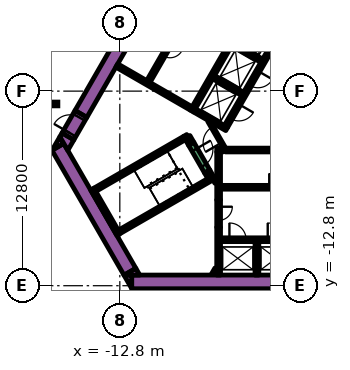
"""IFC4 building model, lengths in metres.
Left out: names, types, materials, properties, quantities, classifications, styles, units other than length and angle.
Written with IfcOpenShell. Run it as: python <this file> out.ifc"""

import sys

from ifc_helpers import new_model, si_unit, direction, frame, frame_2d, origin, origin_2d, place, context, subcontext, project, spatial, polyline, rectangle, outline, extrude, element, fill, save


model = new_model("IFC4")
c1 = context("Model", 3, precision=1e-05, world=origin(), true_north=direction((0.0, 1.0)))
c2 = subcontext(c1, "Body", "Model", "MODEL_VIEW")
j1 = project(units=[si_unit("LENGTHUNIT", "METRE"), si_unit("PLANEANGLEUNIT", "RADIAN")], contexts=[c1])
p1 = place(None, origin())
s1 = spatial("IfcSite", under=j1, at=p1, CompositionType="ELEMENT")
p2 = place(p1, origin())
s2 = spatial("IfcBuilding", under=s1, at=p2, CompositionType="ELEMENT")
p3 = place(p2, origin())
s3 = spatial("IfcBuildingStorey", under=s2, at=p3, CompositionType="ELEMENT", Elevation=0.0)
p4 = place(p3, frame((-15.36, -1.503, -1.8), z_axis=(0.0, 0.0, 1.0), x_axis=(0.50000389221, 0.866023156604, 0.0)))
e1 = element("IfcWall", 1, at=p4, inside=s3, PredefinedType="SOLIDWALL", context=c2, shape_type="SweptSolid", body=[
    extrude(rectangle(XDim=21.0, YDim=0.9, at=frame_2d((10.5, 0.0))), origin(), (0.0, 0.0, 1.0), 7.8),
])
p5 = place(p3, frame((-12.019, -12.55, -1.8), z_axis=(0.0, 0.0, 1.0), x_axis=(1.0, 0.0, 0.0)))
e2 = element("IfcWall", 2, at=p5, inside=s3, PredefinedType="SOLIDWALL", context=c2, shape_type="SweptSolid", body=[
    extrude(rectangle(XDim=21.63, YDim=0.9, at=frame_2d((10.815, 0.0))), origin(), (0.0, 0.0, 1.0), 7.8),
])
p6 = place(p3, frame((0.0, 0.0, -1.8)))
e3 = element("IfcWall", 3, at=p6, inside=s3, PredefinedType="SOLIDWALL", context=c2, shape_type="SweptSolid", body=[
    extrude(outline(polyline([(-12.529, -12.1), (-12.021, -12.1), (-12.021, -12.98), (-12.529, -12.1)])), origin(), (0.0, 0.0, 1.0), 7.8),
])
p7 = place(p3, frame((-12.134, -11.883, -1.8), z_axis=(0.0, 0.0, 1.0), x_axis=(-0.500005339912, 0.866022320763, 0.0)))
e4 = element("IfcWall", 4, at=p7, inside=s3, PredefinedType="SOLIDWALL", context=c2, shape_type="SweptSolid", body=[
    extrude(rectangle(XDim=9.488, YDim=0.9, at=frame_2d((4.744, 0.0))), origin(), (0.0, 0.0, 1.0), 7.8),
])
e5 = element("IfcWall", 5, at=p6, inside=s3, PredefinedType="SOLIDWALL", context=c2, shape_type="SweptSolid", body=[
    extrude(outline(polyline([(-16.489, -3.44), (-17.251, -3.88), (-16.743, -3.0), (-16.489, -3.44)])), origin(), (0.0, 0.0, 1.0), 7.8),
])
e6 = element("IfcWall", 6, at=p6, inside=s3, PredefinedType="SOLIDWALL", context=c2, shape_type="SweptSolid", body=[
    extrude(outline(polyline([(-11.489, -12.1), (-12.505, -12.1), (-11.743, -11.66), (-11.489, -12.1)])), origin(), (0.0, 0.0, 1.0), 7.8),
])
e7 = element("IfcWall", 7, at=p6, inside=s3, PredefinedType="SOLIDWALL", context=c2, shape_type="SweptSolid", body=[
    extrude(outline(polyline([(-15.82, -3.201), (-16.223, -3.9), (-16.743, -3.0), (-16.599, -2.751), (-15.82, -3.201)])), origin(), (0.0, 0.0, 1.0), 7.8),
])
p8 = place(p3, frame((-12.885, -9.431, 0.0), z_axis=(0.0, 0.0, 1.0), x_axis=(-0.500020560727, 0.866013532718, 0.0)))
e8 = element("IfcWall", 8, at=p8, inside=s3, PredefinedType="SOLIDWALL", context=c2, shape_type="SweptSolid", body=[
    extrude(rectangle(XDim=3.45, YDim=0.25, at=frame_2d((1.725, 0.0))), origin(), (0.0, 0.0, 1.0), 6.0),
])
p9 = place(p3, frame((-14.44, -6.49, 0.0), z_axis=(0.0, 0.0, 1.0), x_axis=(0.866022966069, 0.500004222222, 0.0)))
e9 = element("IfcWall", 9, at=p9, inside=s3, PredefinedType="SOLIDWALL", context=c2, shape_type="SweptSolid", body=[
    extrude(rectangle(XDim=6.8, YDim=0.25, at=frame_2d((3.4, 0.0))), origin(), (0.0, 0.0, 1.0), 6.0),
])
p10 = place(p3, frame((-8.168, -3.503, 0.0), z_axis=(0.0, 0.0, 1.0), x_axis=(-0.499952099219, 0.866053057547, 0.0)))
e10 = element("IfcWall", 10, at=p10, inside=s3, PredefinedType="SOLIDWALL", context=c2, shape_type="SweptSolid", body=[
    extrude(rectangle(XDim=0.675, YDim=0.25, at=frame_2d((0.337, 0.0))), origin(), (0.0, 0.0, 1.0), 6.0),
])
p11 = place(p3, frame((-12.84, -9.261, 0.0), z_axis=(0.0, 0.0, 1.0), x_axis=(0.866016039709, 0.500016218704, 0.0)))
e11 = element("IfcWall", 11, at=p11, inside=s3, PredefinedType="SOLIDWALL", context=c2, shape_type="SweptSolid", body=[
    extrude(rectangle(XDim=7.05, YDim=0.25, at=frame_2d((3.525, 0.0))), origin(), (0.0, 0.0, 1.0), 6.0),
])
p12 = place(p3, frame((-6.905, -5.69, 0.0), z_axis=(0.0, 0.0, 1.0), x_axis=(-0.500402024738, 0.865793170242, 0.0)))
e12 = element("IfcWall", 12, at=p12, inside=s3, PredefinedType="SOLIDWALL", context=c2, shape_type="SweptSolid", body=[
    extrude(rectangle(XDim=0.425, YDim=0.25, at=frame_2d((0.212, 0.0))), origin(), (0.0, 0.0, 1.0), 6.0),
])
p13 = place(p3, frame((-3.78, -12.1, -1.8), z_axis=(0.0, 0.0, 1.0), x_axis=(0.0, 1.0, 0.0)))
e13 = element("IfcWall", 13, at=p13, inside=s3, PredefinedType="SOLIDWALL", context=c2, shape_type="SweptSolid", body=[
    extrude(rectangle(XDim=2.2, YDim=0.25, at=frame_2d((1.1, 0.0))), origin(), (0.0, 0.0, 1.0), 7.8),
])
p14 = place(p3, frame((-6.3, -12.1, -1.8), z_axis=(0.0, 0.0, 1.0), x_axis=(0.0, 1.0, 0.0)))
e14 = element("IfcWall", 14, at=p14, inside=s3, PredefinedType="SOLIDWALL", context=c2, shape_type="SweptSolid", body=[
    extrude(rectangle(XDim=3.146, YDim=0.25, at=frame_2d((1.573, 0.0))), origin(), (0.0, 0.0, 1.0), 7.8),
])
p15 = place(p3, frame((-5.845, -3.875, -1.8), z_axis=(0.0, 0.0, 1.0), x_axis=(1.0, 0.0, 0.0)))
e15 = element("IfcWall", 15, at=p15, inside=s3, PredefinedType="SOLIDWALL", context=c2, shape_type="SweptSolid", body=[
    extrude(rectangle(XDim=12.27, YDim=0.25, at=frame_2d((6.135, 0.0))), origin(), (0.0, 0.0, 1.0), 7.8),
])
p16 = place(p3, frame((-6.425, -3.875, -1.8), z_axis=(0.0, 0.0, 1.0), x_axis=(1.0, 0.0, 0.0)))
e16 = element("IfcWall", 16, at=p16, inside=s3, PredefinedType="SOLIDWALL", context=c2, shape_type="SweptSolid", body=[
    extrude(rectangle(XDim=0.428, YDim=0.25, at=frame_2d((0.214, 0.0))), origin(), (0.0, 0.0, 1.0), 7.8),
])
p17 = place(p3, frame((-6.3, -4.0, -1.8), z_axis=(0.0, 0.0, 1.0), x_axis=(0.0, -1.0, 0.0)))
e17 = element("IfcWall", 17, at=p17, inside=s3, PredefinedType="SOLIDWALL", context=c2, shape_type="SweptSolid", body=[
    extrude(rectangle(XDim=3.154, YDim=0.25, at=frame_2d((1.577, 0.0))), origin(), (0.0, 0.0, 1.0), 7.8),
])
p18 = place(p3, frame((-8.06, -1.311, -1.8), z_axis=(0.0, 0.0, 1.0), x_axis=(0.50000273126, 0.866023826885, 0.0)))
e18 = element("IfcWall", 18, at=p18, inside=s3, PredefinedType="SOLIDWALL", context=c2, shape_type="SweptSolid", body=[
    extrude(rectangle(XDim=10.33, YDim=0.25, at=frame_2d((5.165, 0.0))), origin(), (0.0, 0.0, 1.0), 7.8),
])
for number, where, z_axis, x_axis in (
    (19, (-5.369, 3.1, -1.8), (0.0, 0.0, 1.0), (0.866, -0.5, 0.0)),
    (20, (-4.724, -0.182, -1.8), (0.0, 0.0, 1.0), (-0.866, 0.5, 0.0)),
):
    element("IfcWall", number, at=place(p3, frame(where, z_axis=z_axis, x_axis=x_axis)), inside=s3, PredefinedType="SOLIDWALL", context=c2, shape_type="SweptSolid", body=[
        extrude(rectangle(XDim=2.2, YDim=0.25, at=frame_2d((1.1, 0.0))), origin(), (0.0, 0.0, 1.0), 7.8),
    ])
e21 = element("IfcWall", 21, at=p6, inside=s3, PredefinedType="SOLIDWALL", context=c2, shape_type="SweptSolid", body=[
    extrude(outline(polyline([(-5.922, -2.257), (-5.922, -2.257), (-5.705, -2.382), (-5.83, -2.598), (-6.829, -2.021), (-6.88, -1.934), (-6.88, -1.934), (-6.93, -1.963), (-7.952, -1.373), (-7.827, -1.156), (-5.922, -2.257)])), origin(), (0.0, 0.0, 1.0), 7.8),
])
p19 = place(p3, frame((-8.106, -1.14, -1.8), z_axis=(0.0, 0.0, 1.0), x_axis=(-0.866000643155, 0.500042884217, 0.0)))
e22 = element("IfcWall", 22, at=p19, inside=s3, PredefinedType="SOLIDWALL", context=c2, shape_type="SweptSolid", body=[
    extrude(rectangle(XDim=5.65, YDim=0.25, at=frame_2d((2.825, 0.0))), origin(), (0.0, 0.0, 1.0), 7.8),
])
p20 = place(p3, frame((-6.708, -12.068, 0.0), z_axis=(0.0, 0.0, 1.0), x_axis=(0.500000789788, 0.8660249478, 0.0)))
e23 = element("IfcWall", 23, at=p20, inside=s3, PredefinedType="PARTITIONING", context=c2, shape_type="SweptSolid", body=[
    extrude(rectangle(XDim=0.456, YDim=0.15, at=frame_2d((0.228, 0.0))), origin(), (0.0, 0.0, 1.0), 5.1),
])
p21 = place(p3, frame((-6.534, -12.068, 0.0), z_axis=(0.0, 0.0, 1.0), x_axis=(0.500240224089, 0.865886665912, 0.0)))
e24 = element("IfcWall", 24, at=p21, inside=s3, PredefinedType="PARTITIONING", context=c2, shape_type="SweptSolid", body=[
    extrude(rectangle(XDim=0.109, YDim=0.15, at=frame_2d((0.054, 0.0))), origin(), (0.0, 0.0, 1.0), 5.1),
])
p22 = place(p3, frame((-6.48, -6.027, -1.8), z_axis=(0.0, 0.0, 1.0), x_axis=(-0.499927229454, 0.866067413802, 0.0)))
e25 = element("IfcWall", 25, at=p22, inside=s3, PredefinedType="PARTITIONING", context=c2, shape_type="SweptSolid", body=[
    extrude(rectangle(XDim=0.929, YDim=0.15, at=frame_2d((0.464, 0.0))), origin(), (0.0, 0.0, 1.0), 7.8),
])
p23 = place(p3, frame((-8.252, -2.958, 0.0), z_axis=(0.0, 0.0, 1.0), x_axis=(0.500174715838, -0.865924508047, 0.0)))
e26 = element("IfcWall", 26, at=p23, inside=s3, PredefinedType="PARTITIONING", context=c2, shape_type="SweptSolid", body=[
    extrude(rectangle(XDim=0.514, YDim=0.15, at=frame_2d((0.257, 0.0))), origin(), (0.0, 0.0, 1.0), 5.1),
])
p24 = place(p3, frame((-6.175, -9.775, -1.8), z_axis=(0.0, 0.0, 1.0), x_axis=(1.0, 0.0, 0.0)))
e27 = element("IfcWall", 27, at=p24, inside=s3, PredefinedType="SOLIDWALL", context=c2, shape_type="SweptSolid", body=[
    extrude(rectangle(XDim=12.35, YDim=0.25, at=frame_2d((6.175, 0.0))), origin(), (0.0, 0.0, 1.0), 7.8),
])
p25 = place(p24, frame((0.585, 0.0, 1.8)))
e28 = element("IfcOpeningElement", 28, at=p25, cuts=e27, PredefinedType="OPENING", context=c2, shape_type="SweptSolid", body=[
    extrude(rectangle(XDim=1.1, YDim=2.1, at=frame_2d((0.55, 1.05))), frame((0.0, 0.135, 0.0), z_axis=(0.0, -1.0, 0.0), x_axis=(1.0, 0.0, 0.0)), (0.0, 0.0, 1.0), 0.27),
])
p26 = place(p24, frame((3.105, 0.0, 1.8)))
e29 = element("IfcOpeningElement", 29, at=p26, cuts=e27, PredefinedType="OPENING", context=c2, shape_type="SweptSolid", body=[
    extrude(rectangle(XDim=1.1, YDim=2.1, at=frame_2d((0.55, 1.05))), frame((0.0, 0.135, 0.0), z_axis=(0.0, -1.0, 0.0), x_axis=(1.0, 0.0, 0.0)), (0.0, 0.0, 1.0), 0.27),
])
p27 = place(p24, frame((5.625, 0.0, 1.8)))
e30 = element("IfcOpeningElement", 30, at=p27, cuts=e27, PredefinedType="OPENING", context=c2, shape_type="SweptSolid", body=[
    extrude(rectangle(XDim=1.1, YDim=2.1, at=frame_2d((0.55, 1.05))), frame((0.0, 0.135, 0.0), z_axis=(0.0, -1.0, 0.0), x_axis=(1.0, 0.0, 0.0)), (0.0, 0.0, 1.0), 0.27),
])
p28 = place(p24, frame((8.145, 0.0, 1.8)))
e31 = element("IfcOpeningElement", 31, at=p28, cuts=e27, PredefinedType="OPENING", context=c2, shape_type="SweptSolid", body=[
    extrude(rectangle(XDim=1.1, YDim=2.1, at=frame_2d((0.55, 1.05))), frame((0.0, 0.135, 0.0), z_axis=(0.0, -1.0, 0.0), x_axis=(1.0, 0.0, 0.0)), (0.0, 0.0, 1.0), 0.27),
])
p29 = place(p24, frame((10.665, 0.0, 1.8)))
e32 = element("IfcOpeningElement", 32, at=p29, cuts=e27, PredefinedType="OPENING", context=c2, shape_type="SweptSolid", body=[
    extrude(rectangle(XDim=1.1, YDim=2.1, at=frame_2d((0.55, 1.05))), frame((0.0, 0.135, 0.0), z_axis=(0.0, -1.0, 0.0), x_axis=(1.0, 0.0, 0.0)), (0.0, 0.0, 1.0), 0.27),
])
p30 = place(p3, frame((-6.175, -6.325, -1.8), z_axis=(0.0, 0.0, 1.0), x_axis=(1.0, 0.0, 0.0)))
e33 = element("IfcWall", 33, at=p30, inside=s3, PredefinedType="SOLIDWALL", context=c2, shape_type="SweptSolid", body=[
    extrude(rectangle(XDim=12.35, YDim=0.25, at=frame_2d((6.175, 0.0))), origin(), (0.0, 0.0, 1.0), 7.8),
])
p31 = place(p30, frame((3.205, 0.0, 1.8)))
e34 = element("IfcOpeningElement", 34, at=p31, cuts=e33, PredefinedType="OPENING", context=c2, shape_type="SweptSolid", body=[
    extrude(rectangle(XDim=0.9, YDim=2.1, at=frame_2d((0.45, 1.05))), frame((0.0, 0.135, 0.0), z_axis=(0.0, -1.0, 0.0), x_axis=(1.0, 0.0, 0.0)), (0.0, 0.0, 1.0), 0.27),
])
p32 = place(p30, frame((8.145, 0.0, 1.8)))
e35 = element("IfcOpeningElement", 35, at=p32, cuts=e33, PredefinedType="OPENING", context=c2, shape_type="SweptSolid", body=[
    extrude(rectangle(XDim=1.1, YDim=2.1, at=frame_2d((0.55, 1.05))), frame((0.0, 0.135, 0.0), z_axis=(0.0, -1.0, 0.0), x_axis=(1.0, 0.0, 0.0)), (0.0, 0.0, 1.0), 0.27),
])
p33 = place(p30, frame((10.665, 0.0, 1.8)))
e36 = element("IfcOpeningElement", 36, at=p33, cuts=e33, PredefinedType="OPENING", context=c2, shape_type="SweptSolid", body=[
    extrude(rectangle(XDim=1.1, YDim=2.1, at=frame_2d((0.55, 1.05))), frame((0.0, 0.135, 0.0), z_axis=(0.0, -1.0, 0.0), x_axis=(1.0, 0.0, 0.0)), (0.0, 0.0, 1.0), 0.27),
])
p34 = place(p3, frame((-6.008, 9.144, -1.8), z_axis=(0.0, 0.0, 1.0), x_axis=(-0.500006956611, -0.866021387346, 0.0)))
e37 = element("IfcWall", 37, at=p34, inside=s3, PredefinedType="SOLIDWALL", context=c2, shape_type="SweptSolid", body=[
    extrude(rectangle(XDim=9.83, YDim=0.25, at=frame_2d((4.915, 0.0))), origin(), (0.0, 0.0, 1.0), 7.8),
])
p35 = place(p34, frame((0.585, 0.0, 1.8)))
e38 = element("IfcOpeningElement", 38, at=p35, cuts=e37, PredefinedType="OPENING", context=c2, shape_type="SweptSolid", body=[
    extrude(rectangle(XDim=1.1, YDim=2.1, at=frame_2d((0.55, 1.05))), frame((0.0, 0.135, 0.0), z_axis=(0.0, -1.0, 0.0), x_axis=(1.0, 0.0, 0.0)), (0.0, 0.0, 1.0), 0.27),
])
p36 = place(p34, frame((3.105, 0.0, 1.8)))
e39 = element("IfcOpeningElement", 39, at=p36, cuts=e37, PredefinedType="OPENING", context=c2, shape_type="SweptSolid", body=[
    extrude(rectangle(XDim=1.1, YDim=2.1, at=frame_2d((0.55, 1.05))), frame((0.0, 0.135, 0.0), z_axis=(0.0, -1.0, 0.0), x_axis=(1.0, 0.0, 0.0)), (0.0, 0.0, 1.0), 0.27),
])
p37 = place(p34, frame((6.985, 0.0, 1.8)))
e40 = element("IfcOpeningElement", 40, at=p37, cuts=e37, PredefinedType="OPENING", context=c2, shape_type="SweptSolid", body=[
    extrude(rectangle(XDim=0.9, YDim=2.1, at=frame_2d((0.45, 1.05))), frame((0.0, 0.135, 0.0), z_axis=(0.0, -1.0, 0.0), x_axis=(1.0, 0.0, 0.0)), (0.0, 0.0, 1.0), 0.27),
])
p38 = place(p3, frame((-0.898, 6.194, -1.8), z_axis=(0.0, 0.0, 1.0), x_axis=(-0.499996202215, -0.866027596426, 0.0)))
e41 = element("IfcWall", 41, at=p38, inside=s3, PredefinedType="SOLIDWALL", context=c2, shape_type="SweptSolid", body=[
    extrude(rectangle(XDim=9.83, YDim=0.25, at=frame_2d((4.915, 0.0))), origin(), (0.0, 0.0, 1.0), 7.8),
])
p39 = place(p38, frame((0.585, 0.0, 1.8)))
e42 = element("IfcOpeningElement", 42, at=p39, cuts=e41, PredefinedType="OPENING", context=c2, shape_type="SweptSolid", body=[
    extrude(rectangle(XDim=1.1, YDim=2.1, at=frame_2d((0.55, 1.05))), frame((0.0, 0.135, 0.0), z_axis=(0.0, -1.0, 0.0), x_axis=(1.0, 0.0, 0.0)), (0.0, 0.0, 1.0), 0.27),
])
p40 = place(p38, frame((3.105, 0.0, 1.8)))
e43 = element("IfcOpeningElement", 43, at=p40, cuts=e41, PredefinedType="OPENING", context=c2, shape_type="SweptSolid", body=[
    extrude(rectangle(XDim=1.1, YDim=2.1, at=frame_2d((0.55, 1.05))), frame((0.0, 0.135, 0.0), z_axis=(0.0, -1.0, 0.0), x_axis=(1.0, 0.0, 0.0)), (0.0, 0.0, 1.0), 0.27),
])
p41 = place(p38, frame((5.625, 0.0, 1.8)))
e44 = element("IfcOpeningElement", 44, at=p41, cuts=e41, PredefinedType="OPENING", context=c2, shape_type="SweptSolid", body=[
    extrude(rectangle(XDim=1.1, YDim=2.1, at=frame_2d((0.55, 1.05))), frame((0.0, 0.135, 0.0), z_axis=(0.0, -1.0, 0.0), x_axis=(1.0, 0.0, 0.0)), (0.0, 0.0, 1.0), 0.27),
])
p42 = place(p38, frame((8.145, 0.0, 1.8)))
e45 = element("IfcOpeningElement", 45, at=p42, cuts=e41, PredefinedType="OPENING", context=c2, shape_type="SweptSolid", body=[
    extrude(rectangle(XDim=1.1, YDim=2.1, at=frame_2d((0.55, 1.05))), frame((0.0, 0.135, 0.0), z_axis=(0.0, -1.0, 0.0), x_axis=(1.0, 0.0, 0.0)), (0.0, 0.0, 1.0), 0.27),
])
p43 = place(p3, frame((-8.103, -3.466, 0.0), z_axis=(0.0, 0.0, 1.0), x_axis=(0.500078061341, -0.865980330357, 0.0)))
e46 = element("IfcWall", 46, at=p43, inside=s3, PredefinedType="SOLIDWALL", context=c2, shape_type="SweptSolid", body=[
    extrude(rectangle(XDim=2.1, YDim=0.4, at=frame_2d((1.05, 0.0))), origin(), (0.0, 0.0, 1.0), 6.0),
])
p44 = place(p43, frame((0.45, 0.0, 0.0)))
e47 = element("IfcOpeningElement", 47, at=p44, cuts=e46, PredefinedType="OPENING", context=c2, shape_type="SweptSolid", body=[
    extrude(rectangle(XDim=1.2, YDim=2.1, at=frame_2d((0.6, 1.05))), frame((0.0, 0.21, 0.0), z_axis=(0.0, -1.0, 0.0), x_axis=(1.0, 0.0, 0.0)), (0.0, 0.0, 1.0), 0.42),
])
p45 = place(p3, frame((-6.3, -7.154, -1.8), z_axis=(0.0, 0.0, 1.0), x_axis=(0.0, -1.0, 0.0)))
e48 = element("IfcWall", 48, at=p45, inside=s3, PredefinedType="SOLIDWALL", context=c2, shape_type="SweptSolid", body=[
    extrude(rectangle(XDim=1.8, YDim=0.25, at=frame_2d((0.9, 0.0))), origin(), (0.0, 0.0, 1.0), 7.8),
])
p46 = place(p45, frame((0.45, 0.0, 1.8)))
e49 = element("IfcOpeningElement", 49, at=p46, cuts=e48, PredefinedType="OPENING", context=c2, shape_type="SweptSolid", body=[
    extrude(rectangle(XDim=0.9, YDim=2.1, at=frame_2d((0.45, 1.05))), frame((0.0, 0.135, 0.0), z_axis=(0.0, -1.0, 0.0), x_axis=(1.0, 0.0, 0.0)), (0.0, 0.0, 1.0), 0.27),
])
p47 = place(p3, frame((-5.895, -3.79, 0.0), z_axis=(0.0, 0.0, 1.0), x_axis=(-0.49994051562, 0.866059744384, 0.0)))
e50 = element("IfcWall", 50, at=p47, inside=s3, PredefinedType="PARTITIONING", context=c2, shape_type="SweptSolid", body=[
    extrude(rectangle(XDim=2.1, YDim=0.15, at=frame_2d((1.05, 0.0))), origin(), (0.0, 0.0, 1.0), 5.1),
])
p48 = place(p47, frame((0.45, 0.0, 0.0)))
e51 = element("IfcOpeningElement", 51, at=p48, cuts=e50, PredefinedType="OPENING", context=c2, shape_type="SweptSolid", body=[
    extrude(rectangle(XDim=1.2, YDim=2.1, at=frame_2d((0.6, 1.05))), frame((0.0, 0.085, 0.0), z_axis=(0.0, -1.0, 0.0), x_axis=(1.0, 0.0, 0.0)), (0.0, 0.0, 1.0), 0.17),
])
p49 = place(p3, frame((-16.209, -2.976, -1.8), z_axis=(0.0, 0.0, 1.0), x_axis=(0.499954529098, 0.86605165483, 0.0)))
e52 = element("IfcWall", 52, at=p49, inside=s3, PredefinedType="SOLIDWALL", context=c2, shape_type="SweptSolid", body=[
    extrude(rectangle(XDim=1.7, YDim=0.9, at=frame_2d((0.85, 0.0))), origin(), (0.0, 0.0, 1.0), 7.8),
])
p50 = place(p49, frame((0.25, 0.0, 1.8)))
e53 = element("IfcOpeningElement", 53, at=p50, cuts=e52, PredefinedType="OPENING", context=c2, shape_type="SweptSolid", body=[
    extrude(rectangle(XDim=1.2, YDim=2.1, at=frame_2d((0.6, 1.05))), frame((0.0, 0.46, 0.0), z_axis=(0.0, -1.0, 0.0), x_axis=(1.0, 0.0, 0.0)), (0.0, 0.0, 1.0), 0.92),
])
p51 = place(p3, frame((-17.0, -0.845, 0.0), z_axis=(0.0, 0.0, 1.0), x_axis=(1.0, 0.0, 0.0)))
e54 = element("IfcColumn", 54, at=p51, inside=s3, PredefinedType="COLUMN", context=c2, shape_type="SweptSolid", body=[
    extrude(rectangle(XDim=0.25, YDim=0.25, at=origin_2d()), origin(), (0.0, 0.0, 1.0), 5.8),
])
p52 = place(p25, origin())
e55 = element("IfcDoor", 55, at=p52, inside=s3, OperationType="DOUBLE_DOOR_SLIDING", PredefinedType="DOOR", context=c2, shape_type="SweptSolid", body=[
    extrude(rectangle(XDim=1.1, YDim=2.1, at=frame_2d((0.55, 1.05))), frame((0.0, 0.025, 0.0), z_axis=(0.0, -1.0, 0.0), x_axis=(1.0, 0.0, 0.0)), (0.0, 0.0, 1.0), 0.05),
])
fill(e28, e55)
p53 = place(p26, origin())
e56 = element("IfcDoor", 56, at=p53, inside=s3, OperationType="DOUBLE_DOOR_SLIDING", PredefinedType="DOOR", context=c2, shape_type="SweptSolid", body=[
    extrude(rectangle(XDim=1.1, YDim=2.1, at=frame_2d((0.55, 1.05))), frame((0.0, 0.025, 0.0), z_axis=(0.0, -1.0, 0.0), x_axis=(1.0, 0.0, 0.0)), (0.0, 0.0, 1.0), 0.05),
])
fill(e29, e56)
p54 = place(p31, origin())
e57 = element("IfcDoor", 57, at=p54, inside=s3, OperationType="SINGLE_SWING_LEFT", PredefinedType="DOOR", context=c2, shape_type="SweptSolid", body=[
    extrude(rectangle(XDim=0.9, YDim=2.1, at=frame_2d((0.45, 1.05))), frame((0.0, 0.025, 0.0), z_axis=(0.0, -1.0, 0.0), x_axis=(1.0, 0.0, 0.0)), (0.0, 0.0, 1.0), 0.05),
])
fill(e34, e57)
p55 = place(p37, origin())
e58 = element("IfcDoor", 58, at=p55, inside=s3, OperationType="SINGLE_SWING_LEFT", PredefinedType="DOOR", context=c2, shape_type="SweptSolid", body=[
    extrude(rectangle(XDim=0.9, YDim=2.1, at=frame_2d((0.45, 1.05))), frame((0.0, 0.025, 0.0), z_axis=(0.0, -1.0, 0.0), x_axis=(1.0, 0.0, 0.0)), (0.0, 0.0, 1.0), 0.05),
])
fill(e40, e58)
p56 = place(p40, origin())
e59 = element("IfcDoor", 59, at=p56, inside=s3, OperationType="DOUBLE_DOOR_SLIDING", PredefinedType="DOOR", context=c2, shape_type="SweptSolid", body=[
    extrude(rectangle(XDim=1.1, YDim=2.1, at=frame_2d((0.55, 1.05))), frame((0.0, 0.025, 0.0), z_axis=(0.0, -1.0, 0.0), x_axis=(1.0, 0.0, 0.0)), (0.0, 0.0, 1.0), 0.05),
])
fill(e43, e59)
p57 = place(p41, origin())
e60 = element("IfcDoor", 60, at=p57, inside=s3, OperationType="DOUBLE_DOOR_SLIDING", PredefinedType="DOOR", context=c2, shape_type="SweptSolid", body=[
    extrude(rectangle(XDim=1.1, YDim=2.1, at=frame_2d((0.55, 1.05))), frame((0.0, 0.025, 0.0), z_axis=(0.0, -1.0, 0.0), x_axis=(1.0, 0.0, 0.0)), (0.0, 0.0, 1.0), 0.05),
])
fill(e44, e60)
p58 = place(p42, origin())
e61 = element("IfcDoor", 61, at=p58, inside=s3, OperationType="DOUBLE_DOOR_SLIDING", PredefinedType="DOOR", context=c2, shape_type="SweptSolid", body=[
    extrude(rectangle(XDim=1.1, YDim=2.1, at=frame_2d((0.55, 1.05))), frame((0.0, 0.025, 0.0), z_axis=(0.0, -1.0, 0.0), x_axis=(1.0, 0.0, 0.0)), (0.0, 0.0, 1.0), 0.05),
])
fill(e45, e61)
p59 = place(p44, origin())
e62 = element("IfcDoor", 62, at=p59, inside=s3, OperationType="SINGLE_SWING_LEFT", PredefinedType="DOOR", context=c2, shape_type="SweptSolid", body=[
    extrude(rectangle(XDim=1.2, YDim=2.1, at=frame_2d((0.6, 1.05))), frame((0.0, 0.025, 0.0), z_axis=(0.0, -1.0, 0.0), x_axis=(1.0, 0.0, 0.0)), (0.0, 0.0, 1.0), 0.05),
])
fill(e47, e62)
p60 = place(p46, origin())
e63 = element("IfcDoor", 63, at=p60, inside=s3, OperationType="SINGLE_SWING_LEFT", PredefinedType="DOOR", context=c2, shape_type="SweptSolid", body=[
    extrude(rectangle(XDim=0.9, YDim=2.1, at=frame_2d((0.45, 1.05))), frame((0.0, 0.025, 0.0), z_axis=(0.0, -1.0, 0.0), x_axis=(1.0, 0.0, 0.0)), (0.0, 0.0, 1.0), 0.05),
])
fill(e49, e63)
p61 = place(p48, origin())
e64 = element("IfcDoor", 64, at=p61, inside=s3, OperationType="SINGLE_SWING_LEFT", PredefinedType="DOOR", context=c2, shape_type="SweptSolid", body=[
    extrude(rectangle(XDim=1.2, YDim=2.1, at=frame_2d((0.6, 1.05))), frame((0.0, 0.025, 0.0), z_axis=(0.0, -1.0, 0.0), x_axis=(1.0, 0.0, 0.0)), (0.0, 0.0, 1.0), 0.05),
])
fill(e51, e64)
p62 = place(p50, origin())
e65 = element("IfcDoor", 65, at=p62, inside=s3, OperationType="SINGLE_SWING_LEFT", PredefinedType="DOOR", context=c2, shape_type="SweptSolid", body=[
    extrude(rectangle(XDim=1.2, YDim=2.1, at=frame_2d((0.6, 1.05))), frame((0.0, 0.025, 0.0), z_axis=(0.0, -1.0, 0.0), x_axis=(1.0, 0.0, 0.0)), (0.0, 0.0, 1.0), 0.05),
])
fill(e53, e65)
save(model, sys.argv[1])
